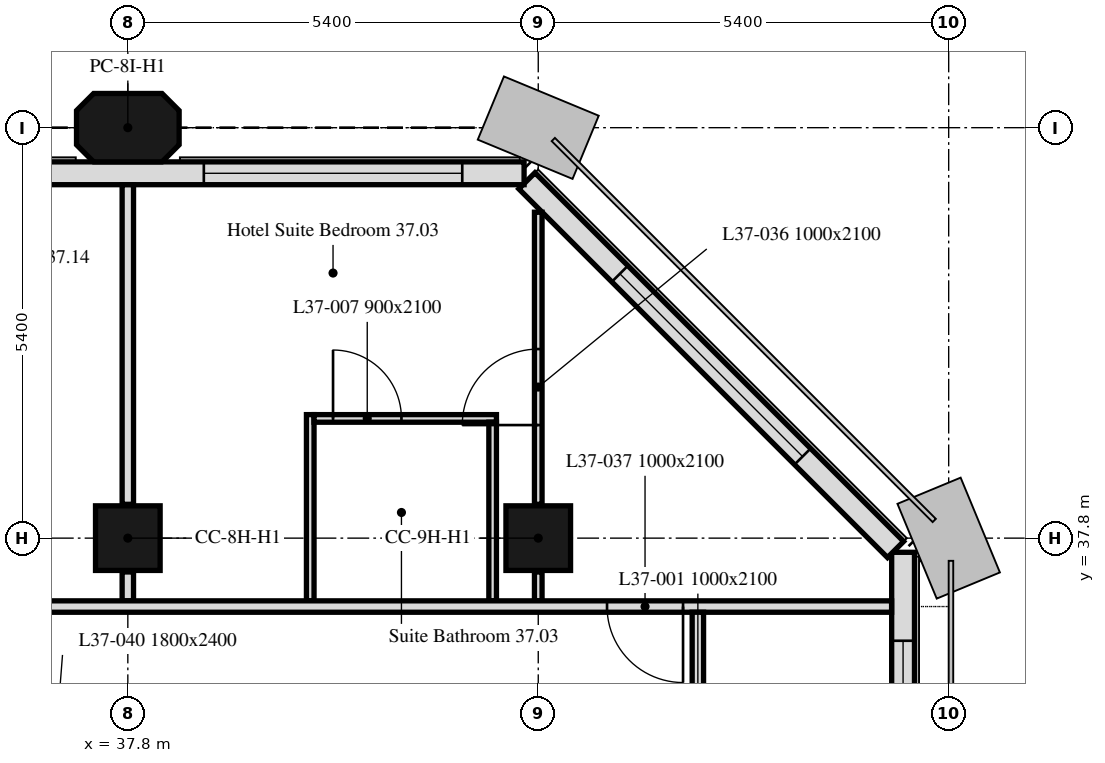
"""IFC4 building model, lengths in metres.
Left out: names, types, materials, properties, quantities, classifications, styles, units other than length and angle.
Written with IfcOpenShell. Run it as: python <this file> out.ifc"""

import sys

from ifc_helpers import new_model, si_unit, direction, frame, frame_2d, origin, origin_2d, place, context, subcontext, project, spatial, polyline, rectangle, outline, extrude, element, fill, save


model = new_model("IFC4")
c1 = context("Model", 3, precision=1e-05, world=origin(), true_north=direction((0.0, 1.0)))
c2 = subcontext(c1, "Body", "Model", "MODEL_VIEW")
j1 = project(units=[si_unit("LENGTHUNIT", "METRE"), si_unit("PLANEANGLEUNIT", "RADIAN")], contexts=[c1])
p1 = place(None, origin())
s1 = spatial("IfcSite", under=j1, at=p1, CompositionType="ELEMENT")
p2 = place(p1, origin())
s2 = spatial("IfcBuilding", under=s1, at=p2, CompositionType="ELEMENT")
p3 = place(p2, frame((0.0, 0.0, 159.4)))
s3 = spatial("IfcBuildingStorey", under=s2, at=p3, CompositionType="ELEMENT", Elevation=159.4)
for number, where, z_axis, x_axis in (
    (1, (37.8, 37.8, 0.0), (0.0, 0.0, 1.0), (1.0, 0.0, 0.0)),
    (2, (43.2, 37.8, 0.0), (0.0, 0.0, 1.0), (1.0, 0.0, 0.0)),
):
    element("IfcColumn", number, at=place(p3, frame(where, z_axis=z_axis, x_axis=x_axis)), inside=s3, PredefinedType="COLUMN", context=c2, shape_type="SweptSolid", body=[
        extrude(rectangle(XDim=0.85, YDim=0.85, at=origin_2d()), origin(), (0.0, 0.0, 1.0), 3.0),
    ])
p4 = place(p3, frame((37.8, 43.2, 0.0), z_axis=(0.0, 0.0, 1.0), x_axis=(1.0, 0.0, 0.0)))
e3 = element("IfcColumn", 3, at=p4, inside=s3, PredefinedType="COLUMN", context=c2, shape_type="SweptSolid", body=[
    extrude(outline(polyline([(-0.45, -0.45), (0.45, -0.45), (0.675, -0.225), (0.675, 0.225), (0.45, 0.45), (-0.45, 0.45), (-0.675, 0.225), (-0.675, -0.225), (-0.45, -0.45)])), origin(), (0.0, 0.0, 1.0), 3.0),
])
p5 = place(p3, frame((48.0, 5.586, 0.0), z_axis=(0.0, 0.0, 1.0), x_axis=(0.0, 1.0, 0.0)))
e4 = element("IfcWall", 4, at=p5, inside=s3, PredefinedType="SOLIDWALL", context=c2, shape_type="SweptSolid", body=[
    extrude(rectangle(XDim=32.027, YDim=0.3, at=frame_2d((16.014, 0.0))), origin(), (0.0, 0.0, 1.0), 3.0),
])
p6 = place(p5, frame((1.789, 0.0, 0.9)))
e5 = element("IfcOpeningElement", 5, at=p6, cuts=e4, PredefinedType="OPENING", context=c2, shape_type="SweptSolid", body=[
    extrude(rectangle(XDim=0.65, YDim=1.7, at=frame_2d((0.325, 0.85))), frame((0.0, 0.16, 0.0), z_axis=(0.0, -1.0, 0.0), x_axis=(1.0, 0.0, 0.0)), (0.0, 0.0, 1.0), 0.32),
])
p7 = place(p5, frame((2.764, 0.0, 0.9)))
e6 = element("IfcOpeningElement", 6, at=p7, cuts=e4, PredefinedType="OPENING", context=c2, shape_type="SweptSolid", body=[
    extrude(rectangle(XDim=1.1, YDim=1.7, at=frame_2d((0.55, 0.85))), frame((0.0, 0.16, 0.0), z_axis=(0.0, -1.0, 0.0), x_axis=(1.0, 0.0, 0.0)), (0.0, 0.0, 1.0), 0.32),
])
p8 = place(p5, frame((6.564, 0.0, 0.9)))
e7 = element("IfcOpeningElement", 7, at=p8, cuts=e4, PredefinedType="OPENING", context=c2, shape_type="SweptSolid", body=[
    extrude(rectangle(XDim=1.1, YDim=1.7, at=frame_2d((0.55, 0.85))), frame((0.0, 0.16, 0.0), z_axis=(0.0, -1.0, 0.0), x_axis=(1.0, 0.0, 0.0)), (0.0, 0.0, 1.0), 0.32),
])
p9 = place(p5, frame((8.164, 0.0, 0.9)))
e8 = element("IfcOpeningElement", 8, at=p9, cuts=e4, PredefinedType="OPENING", context=c2, shape_type="SweptSolid", body=[
    extrude(rectangle(XDim=1.1, YDim=1.7, at=frame_2d((0.55, 0.85))), frame((0.0, 0.16, 0.0), z_axis=(0.0, -1.0, 0.0), x_axis=(1.0, 0.0, 0.0)), (0.0, 0.0, 1.0), 0.32),
])
p10 = place(p5, frame((11.614, 0.0, 0.9)))
e9 = element("IfcOpeningElement", 9, at=p10, cuts=e4, PredefinedType="OPENING", context=c2, shape_type="SweptSolid", body=[
    extrude(rectangle(XDim=3.4, YDim=1.7, at=frame_2d((1.7, 0.85))), frame((0.0, 0.16, 0.0), z_axis=(0.0, -1.0, 0.0), x_axis=(1.0, 0.0, 0.0)), (0.0, 0.0, 1.0), 0.32),
])
p11 = place(p5, frame((17.364, 0.0, 0.9)))
e10 = element("IfcOpeningElement", 10, at=p11, cuts=e4, PredefinedType="OPENING", context=c2, shape_type="SweptSolid", body=[
    extrude(rectangle(XDim=1.1, YDim=1.7, at=frame_2d((0.55, 0.85))), frame((0.0, 0.16, 0.0), z_axis=(0.0, -1.0, 0.0), x_axis=(1.0, 0.0, 0.0)), (0.0, 0.0, 1.0), 0.32),
])
p12 = place(p5, frame((18.964, 0.0, 0.9)))
e11 = element("IfcOpeningElement", 11, at=p12, cuts=e4, PredefinedType="OPENING", context=c2, shape_type="SweptSolid", body=[
    extrude(rectangle(XDim=1.1, YDim=1.7, at=frame_2d((0.55, 0.85))), frame((0.0, 0.16, 0.0), z_axis=(0.0, -1.0, 0.0), x_axis=(1.0, 0.0, 0.0)), (0.0, 0.0, 1.0), 0.32),
])
p13 = place(p5, frame((22.414, 0.0, 0.9)))
e12 = element("IfcOpeningElement", 12, at=p13, cuts=e4, PredefinedType="OPENING", context=c2, shape_type="SweptSolid", body=[
    extrude(rectangle(XDim=3.4, YDim=1.7, at=frame_2d((1.7, 0.85))), frame((0.0, 0.16, 0.0), z_axis=(0.0, -1.0, 0.0), x_axis=(1.0, 0.0, 0.0)), (0.0, 0.0, 1.0), 0.32),
])
p14 = place(p5, frame((28.164, 0.0, 0.9)))
e13 = element("IfcOpeningElement", 13, at=p14, cuts=e4, PredefinedType="OPENING", context=c2, shape_type="SweptSolid", body=[
    extrude(rectangle(XDim=1.1, YDim=1.7, at=frame_2d((0.55, 0.85))), frame((0.0, 0.16, 0.0), z_axis=(0.0, -1.0, 0.0), x_axis=(1.0, 0.0, 0.0)), (0.0, 0.0, 1.0), 0.32),
])
p15 = place(p5, frame((29.764, 0.0, 0.9)))
e14 = element("IfcOpeningElement", 14, at=p15, cuts=e4, PredefinedType="OPENING", context=c2, shape_type="SweptSolid", body=[
    extrude(rectangle(XDim=1.1, YDim=1.7, at=frame_2d((0.55, 0.85))), frame((0.0, 0.16, 0.0), z_axis=(0.0, -1.0, 0.0), x_axis=(1.0, 0.0, 0.0)), (0.0, 0.0, 1.0), 0.32),
])
p16 = place(p3, frame((47.901, 37.65, 0.0), z_axis=(0.0, 0.0, 1.0), x_axis=(-0.707106781187, 0.707106781187, 0.0)))
e15 = element("IfcWall", 15, at=p16, inside=s3, PredefinedType="SOLIDWALL", context=c2, shape_type="SweptSolid", body=[
    extrude(rectangle(XDim=6.86, YDim=0.3, at=frame_2d((3.43, 0.0))), origin(), (0.0, 0.0, 1.0), 3.0),
])
p17 = place(p16, frame((1.73, 0.0, 0.9)))
e16 = element("IfcOpeningElement", 16, at=p17, cuts=e15, PredefinedType="OPENING", context=c2, shape_type="SweptSolid", body=[
    extrude(rectangle(XDim=3.4, YDim=1.7, at=frame_2d((1.7, 0.85))), frame((0.0, 0.16, 0.0), z_axis=(0.0, -1.0, 0.0), x_axis=(1.0, 0.0, 0.0)), (0.0, 0.0, 1.0), 0.32),
])
p18 = place(p3, frame((43.014, 42.6, 0.0), z_axis=(0.0, 0.0, 1.0), x_axis=(-1.0, 0.0, 0.0)))
e17 = element("IfcWall", 17, at=p18, inside=s3, PredefinedType="SOLIDWALL", context=c2, shape_type="SweptSolid", body=[
    extrude(rectangle(XDim=32.027, YDim=0.3, at=frame_2d((16.014, 0.0))), origin(), (0.0, 0.0, 1.0), 3.0),
])
p19 = place(p18, frame((0.814, 0.0, 0.9)))
e18 = element("IfcOpeningElement", 18, at=p19, cuts=e17, PredefinedType="OPENING", context=c2, shape_type="SweptSolid", body=[
    extrude(rectangle(XDim=3.4, YDim=1.7, at=frame_2d((1.7, 0.85))), frame((0.0, 0.16, 0.0), z_axis=(0.0, -1.0, 0.0), x_axis=(1.0, 0.0, 0.0)), (0.0, 0.0, 1.0), 0.32),
])
p20 = place(p18, frame((6.564, 0.0, 0.9)))
e19 = element("IfcOpeningElement", 19, at=p20, cuts=e17, PredefinedType="OPENING", context=c2, shape_type="SweptSolid", body=[
    extrude(rectangle(XDim=1.1, YDim=1.7, at=frame_2d((0.55, 0.85))), frame((0.0, 0.16, 0.0), z_axis=(0.0, -1.0, 0.0), x_axis=(1.0, 0.0, 0.0)), (0.0, 0.0, 1.0), 0.32),
])
p21 = place(p18, frame((11.614, 0.0, 0.9)))
e20 = element("IfcOpeningElement", 20, at=p21, cuts=e17, PredefinedType="OPENING", context=c2, shape_type="SweptSolid", body=[
    extrude(rectangle(XDim=3.4, YDim=1.7, at=frame_2d((1.7, 0.85))), frame((0.0, 0.16, 0.0), z_axis=(0.0, -1.0, 0.0), x_axis=(1.0, 0.0, 0.0)), (0.0, 0.0, 1.0), 0.32),
])
p22 = place(p18, frame((17.364, 0.0, 0.9)))
e21 = element("IfcOpeningElement", 21, at=p22, cuts=e17, PredefinedType="OPENING", context=c2, shape_type="SweptSolid", body=[
    extrude(rectangle(XDim=1.1, YDim=1.7, at=frame_2d((0.55, 0.85))), frame((0.0, 0.16, 0.0), z_axis=(0.0, -1.0, 0.0), x_axis=(1.0, 0.0, 0.0)), (0.0, 0.0, 1.0), 0.32),
])
p23 = place(p18, frame((22.414, 0.0, 0.9)))
e22 = element("IfcOpeningElement", 22, at=p23, cuts=e17, PredefinedType="OPENING", context=c2, shape_type="SweptSolid", body=[
    extrude(rectangle(XDim=3.4, YDim=1.7, at=frame_2d((1.7, 0.85))), frame((0.0, 0.16, 0.0), z_axis=(0.0, -1.0, 0.0), x_axis=(1.0, 0.0, 0.0)), (0.0, 0.0, 1.0), 0.32),
])
p24 = place(p18, frame((28.164, 0.0, 0.9)))
e23 = element("IfcOpeningElement", 23, at=p24, cuts=e17, PredefinedType="OPENING", context=c2, shape_type="SweptSolid", body=[
    extrude(rectangle(XDim=1.1, YDim=1.7, at=frame_2d((0.55, 0.85))), frame((0.0, 0.16, 0.0), z_axis=(0.0, -1.0, 0.0), x_axis=(1.0, 0.0, 0.0)), (0.0, 0.0, 1.0), 0.32),
])
p25 = place(p3, frame((37.8, 36.975, 0.0), z_axis=(0.0, 0.0, 1.0), x_axis=(0.0, 1.0, 0.0)))
e24 = element("IfcWall", 24, at=p25, inside=s3, PredefinedType="PARTITIONING", context=c2, shape_type="SweptSolid", body=[
    extrude(rectangle(XDim=0.38, YDim=0.15, at=frame_2d((0.19, 0.0))), origin(), (0.0, 0.0, 1.0), 3.0),
])
p26 = place(p3, frame((37.8, 38.245, 0.0), z_axis=(0.0, 0.0, 1.0), x_axis=(0.0, 1.0, 0.0)))
e25 = element("IfcWall", 25, at=p26, inside=s3, PredefinedType="PARTITIONING", context=c2, shape_type="SweptSolid", body=[
    extrude(rectangle(XDim=4.204, YDim=0.15, at=frame_2d((2.102, 0.0))), origin(), (0.0, 0.0, 1.0), 3.0),
])
p27 = place(p3, frame((40.2, 36.975, 0.0), z_axis=(0.0, 0.0, 1.0), x_axis=(0.0, 1.0, 0.0)))
e26 = element("IfcWall", 26, at=p27, inside=s3, PredefinedType="PARTITIONING", context=c2, shape_type="SweptSolid", body=[
    extrude(rectangle(XDim=2.45, YDim=0.1, at=frame_2d((1.225, 0.0))), origin(), (0.0, 0.0, 1.0), 3.0),
])
p28 = place(p3, frame((40.25, 39.375, 0.0), z_axis=(0.0, 0.0, 1.0), x_axis=(1.0, 0.0, 0.0)))
e27 = element("IfcWall", 27, at=p28, inside=s3, PredefinedType="PARTITIONING", context=c2, shape_type="SweptSolid", body=[
    extrude(rectangle(XDim=2.4, YDim=0.1, at=frame_2d((1.2, 0.0))), origin(), (0.0, 0.0, 1.0), 3.0),
])
p29 = place(p28, frame((0.25, 0.0, 0.0)))
e28 = element("IfcOpeningElement", 28, at=p29, cuts=e27, PredefinedType="OPENING", context=c2, shape_type="SweptSolid", body=[
    extrude(rectangle(XDim=0.9, YDim=2.1, at=frame_2d((0.45, 1.05))), frame((0.0, 0.05, 0.0), z_axis=(0.0, -1.0, 0.0), x_axis=(1.0, 0.0, 0.0)), (0.0, 0.0, 1.0), 0.1),
])
p30 = place(p3, frame((42.6, 39.325, 0.0), z_axis=(0.0, 0.0, 1.0), x_axis=(0.0, -1.0, 0.0)))
e29 = element("IfcWall", 29, at=p30, inside=s3, PredefinedType="PARTITIONING", context=c2, shape_type="SweptSolid", body=[
    extrude(rectangle(XDim=2.35, YDim=0.1, at=frame_2d((1.175, 0.0))), origin(), (0.0, 0.0, 1.0), 3.0),
])
p31 = place(p3, frame((43.2, 36.975, 0.0), z_axis=(0.0, 0.0, 1.0), x_axis=(0.0, 1.0, 0.0)))
e30 = element("IfcWall", 30, at=p31, inside=s3, PredefinedType="PARTITIONING", context=c2, shape_type="SweptSolid", body=[
    extrude(rectangle(XDim=0.38, YDim=0.1, at=frame_2d((0.19, 0.0))), origin(), (0.0, 0.0, 1.0), 3.0),
])
p32 = place(p3, frame((43.2, 38.245, 0.0), z_axis=(0.0, 0.0, 1.0), x_axis=(0.0, 1.0, 0.0)))
e31 = element("IfcWall", 31, at=p32, inside=s3, PredefinedType="PARTITIONING", context=c2, shape_type="SweptSolid", body=[
    extrude(rectangle(XDim=3.843, YDim=0.1, at=frame_2d((1.921, 0.0))), origin(), (0.0, 0.0, 1.0), 3.0),
])
p33 = place(p32, frame((1.042, 0.0, 0.0)))
e32 = element("IfcOpeningElement", 32, at=p33, cuts=e31, PredefinedType="OPENING", context=c2, shape_type="SweptSolid", body=[
    extrude(rectangle(XDim=1.0, YDim=2.1, at=frame_2d((0.5, 1.05))), frame((0.0, 0.05, 0.0), z_axis=(0.0, -1.0, 0.0), x_axis=(1.0, 0.0, 0.0)), (0.0, 0.0, 1.0), 0.1),
])
p34 = place(p3, frame((47.849, 36.9, 0.0), z_axis=(0.0, 0.0, 1.0), x_axis=(-1.0, 0.0, 0.0)))
e33 = element("IfcWall", 33, at=p34, inside=s3, PredefinedType="PARTITIONING", context=c2, shape_type="SweptSolid", body=[
    extrude(rectangle(XDim=41.698, YDim=0.15, at=frame_2d((20.849, 0.0))), origin(), (0.0, 0.0, 1.0), 3.0),
])
p35 = place(p34, frame((39.249, 0.0, 0.0)))
e34 = element("IfcOpeningElement", 34, at=p35, cuts=e33, PredefinedType="OPENING", context=c2, shape_type="SweptSolid", body=[
    extrude(rectangle(XDim=1.0, YDim=2.1, at=frame_2d((0.5, 1.05))), frame((0.0, 0.075, 0.0), z_axis=(0.0, -1.0, 0.0), x_axis=(1.0, 0.0, 0.0)), (0.0, 0.0, 1.0), 0.15),
])
p36 = place(p34, frame((27.649, 0.0, 0.0)))
e35 = element("IfcOpeningElement", 35, at=p36, cuts=e33, PredefinedType="OPENING", context=c2, shape_type="SweptSolid", body=[
    extrude(rectangle(XDim=1.0, YDim=2.1, at=frame_2d((0.5, 1.05))), frame((0.0, 0.075, 0.0), z_axis=(0.0, -1.0, 0.0), x_axis=(1.0, 0.0, 0.0)), (0.0, 0.0, 1.0), 0.15),
])
p37 = place(p34, frame((22.249, 0.0, 0.0)))
e36 = element("IfcOpeningElement", 36, at=p37, cuts=e33, PredefinedType="OPENING", context=c2, shape_type="SweptSolid", body=[
    extrude(rectangle(XDim=1.0, YDim=2.1, at=frame_2d((0.5, 1.05))), frame((0.0, 0.075, 0.0), z_axis=(0.0, -1.0, 0.0), x_axis=(1.0, 0.0, 0.0)), (0.0, 0.0, 1.0), 0.15),
])
p38 = place(p34, frame((16.849, 0.0, 0.0)))
e37 = element("IfcOpeningElement", 37, at=p38, cuts=e33, PredefinedType="OPENING", context=c2, shape_type="SweptSolid", body=[
    extrude(rectangle(XDim=1.0, YDim=2.1, at=frame_2d((0.5, 1.05))), frame((0.0, 0.075, 0.0), z_axis=(0.0, -1.0, 0.0), x_axis=(1.0, 0.0, 0.0)), (0.0, 0.0, 1.0), 0.15),
])
p39 = place(p34, frame((11.449, 0.0, 0.0)))
e38 = element("IfcOpeningElement", 38, at=p39, cuts=e33, PredefinedType="OPENING", context=c2, shape_type="SweptSolid", body=[
    extrude(rectangle(XDim=1.0, YDim=2.1, at=frame_2d((0.5, 1.05))), frame((0.0, 0.075, 0.0), z_axis=(0.0, -1.0, 0.0), x_axis=(1.0, 0.0, 0.0)), (0.0, 0.0, 1.0), 0.15),
])
p40 = place(p34, frame((2.744, 0.0, 0.0)))
e39 = element("IfcOpeningElement", 39, at=p40, cuts=e33, PredefinedType="OPENING", context=c2, shape_type="SweptSolid", body=[
    extrude(rectangle(XDim=1.0, YDim=2.1, at=frame_2d((0.5, 1.05))), frame((0.0, 0.075, 0.0), z_axis=(0.0, -1.0, 0.0), x_axis=(1.0, 0.0, 0.0)), (0.0, 0.0, 1.0), 0.15),
])
p41 = place(p3, frame((45.3, 36.825, 0.0), z_axis=(0.0, 0.0, 1.0), x_axis=(0.0, -1.0, 0.0)))
e40 = element("IfcWall", 40, at=p41, inside=s3, PredefinedType="PARTITIONING", context=c2, shape_type="SweptSolid", body=[
    extrude(rectangle(XDim=15.15, YDim=0.15, at=frame_2d((7.575, 0.0))), origin(), (0.0, 0.0, 1.0), 2.4),
])
p42 = place(p41, frame((1.675, 0.0, 0.0)))
e41 = element("IfcOpeningElement", 41, at=p42, cuts=e40, PredefinedType="OPENING", context=c2, shape_type="SweptSolid", body=[
    extrude(rectangle(XDim=1.0, YDim=2.1, at=frame_2d((0.5, 1.05))), frame((0.0, 0.075, 0.0), z_axis=(0.0, -1.0, 0.0), x_axis=(1.0, 0.0, 0.0)), (0.0, 0.0, 1.0), 0.15),
])
p43 = place(p41, frame((7.975, 0.0, 0.0)))
e42 = element("IfcOpeningElement", 42, at=p43, cuts=e40, PredefinedType="OPENING", context=c2, shape_type="SweptSolid", body=[
    extrude(rectangle(XDim=1.0, YDim=2.1, at=frame_2d((0.5, 1.05))), frame((0.0, 0.075, 0.0), z_axis=(0.0, -1.0, 0.0), x_axis=(1.0, 0.0, 0.0)), (0.0, 0.0, 1.0), 0.15),
])
p44 = place(p15, origin())
e43 = element("IfcWindow", 43, at=p44, inside=s3, PartitioningType="SINGLE_PANEL", PredefinedType="WINDOW", context=c2, shape_type="SweptSolid", body=[
    extrude(rectangle(XDim=1.1, YDim=1.7, at=frame_2d((0.55, 0.85))), frame((0.0, 0.03, 0.0), z_axis=(0.0, -1.0, 0.0), x_axis=(1.0, 0.0, 0.0)), (0.0, 0.0, 1.0), 0.06),
])
fill(e14, e43)
p45 = place(p17, origin())
e44 = element("IfcWindow", 44, at=p45, inside=s3, PartitioningType="SINGLE_PANEL", PredefinedType="WINDOW", context=c2, shape_type="SweptSolid", body=[
    extrude(rectangle(XDim=3.4, YDim=1.7, at=frame_2d((1.7, 0.85))), frame((0.0, 0.03, 0.0), z_axis=(0.0, -1.0, 0.0), x_axis=(1.0, 0.0, 0.0)), (0.0, 0.0, 1.0), 0.06),
])
fill(e16, e44)
p46 = place(p19, origin())
e45 = element("IfcWindow", 45, at=p46, inside=s3, PartitioningType="SINGLE_PANEL", PredefinedType="WINDOW", context=c2, shape_type="SweptSolid", body=[
    extrude(rectangle(XDim=3.4, YDim=1.7, at=frame_2d((1.7, 0.85))), frame((0.0, 0.03, 0.0), z_axis=(0.0, -1.0, 0.0), x_axis=(1.0, 0.0, 0.0)), (0.0, 0.0, 1.0), 0.06),
])
fill(e18, e45)
p47 = place(p29, origin())
e46 = element("IfcDoor", 46, at=p47, inside=s3, OperationType="SINGLE_SWING_LEFT", PredefinedType="DOOR", context=c2, shape_type="SweptSolid", body=[
    extrude(rectangle(XDim=0.9, YDim=2.1, at=frame_2d((0.45, 1.05))), frame((0.0, 0.025, 0.0), z_axis=(0.0, -1.0, 0.0), x_axis=(1.0, 0.0, 0.0)), (0.0, 0.0, 1.0), 0.05),
])
fill(e28, e46)
p48 = place(p33, origin())
e47 = element("IfcDoor", 47, at=p48, inside=s3, OperationType="SINGLE_SWING_LEFT", PredefinedType="DOOR", context=c2, shape_type="SweptSolid", body=[
    extrude(rectangle(XDim=1.0, YDim=2.1, at=frame_2d((0.5, 1.05))), frame((0.0, 0.025, 0.0), z_axis=(0.0, -1.0, 0.0), x_axis=(1.0, 0.0, 0.0)), (0.0, 0.0, 1.0), 0.05),
])
fill(e32, e47)
p49 = place(p40, origin())
e48 = element("IfcDoor", 48, at=p49, inside=s3, OperationType="SINGLE_SWING_LEFT", PredefinedType="DOOR", context=c2, shape_type="SweptSolid", body=[
    extrude(rectangle(XDim=1.0, YDim=2.1, at=frame_2d((0.5, 1.05))), frame((0.0, 0.025, 0.0), z_axis=(0.0, -1.0, 0.0), x_axis=(1.0, 0.0, 0.0)), (0.0, 0.0, 1.0), 0.05),
])
fill(e39, e48)
save(model, sys.argv[1])
